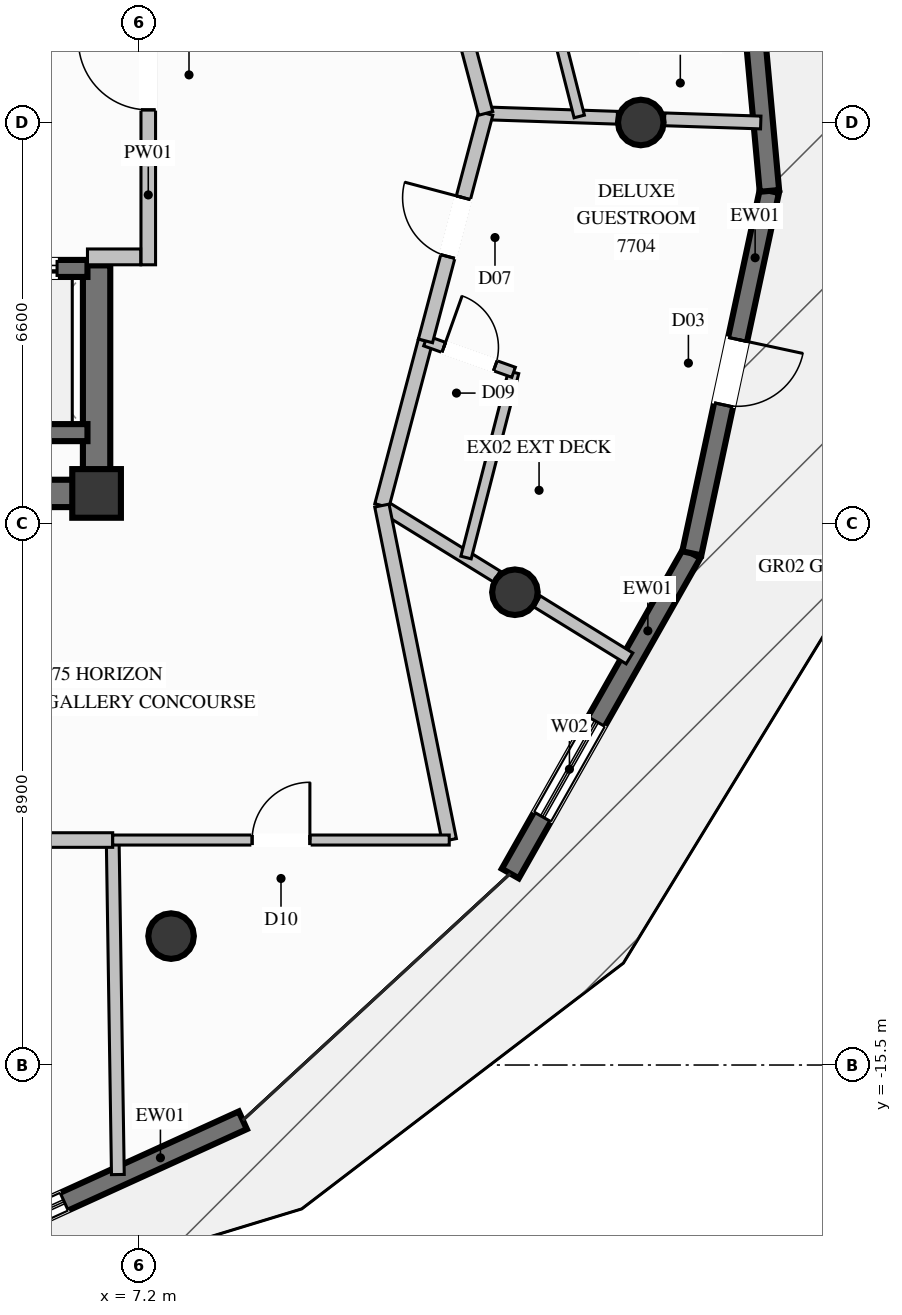
"""IFC4 building model, lengths in metres.
Left out: names, types, materials, properties, quantities, classifications, styles, units other than length and angle.
Written with IfcOpenShell. Run it as: python <this file> out.ifc"""

import sys

from ifc_helpers import new_model, si_unit, direction, frame, frame_2d, origin, origin_2d, place, context, subcontext, project, spatial, rectangle, circle, extrude, element, fill, save


model = new_model("IFC4")
c1 = context("Model", 3, precision=1e-05, world=origin(), true_north=direction((0.0, 1.0)))
c2 = subcontext(c1, "Body", "Model", "MODEL_VIEW")
j1 = project(units=[si_unit("LENGTHUNIT", "METRE"), si_unit("PLANEANGLEUNIT", "RADIAN")], contexts=[c1])
p1 = place(None, origin())
s1 = spatial("IfcSite", under=j1, at=p1, CompositionType="ELEMENT")
p2 = place(p1, origin())
s2 = spatial("IfcBuilding", under=s1, at=p2, CompositionType="ELEMENT")
p3 = place(p2, frame((0.0, 0.0, 289.6)))
s3 = spatial("IfcBuildingStorey", under=s2, at=p3, CompositionType="ELEMENT", Elevation=289.6)
p4 = place(p3, frame((6.5, -6.1, 0.0), z_axis=(0.0, 0.0, 1.0), x_axis=(1.0, 0.0, 0.0)))
e1 = element("IfcColumn", 1, at=p4, inside=s3, PredefinedType="COLUMN", context=c2, shape_type="SweptSolid", body=[
    extrude(rectangle(XDim=0.8, YDim=0.8, at=origin_2d()), origin(), (0.0, 0.0, 1.0), 3.8),
])
p5 = place(p3, frame((4.15, -6.1, 0.0), z_axis=(0.0, 0.0, 1.0), x_axis=(1.0, 0.0, 0.0)))
e2 = element("IfcWall", 2, at=p5, inside=s3, PredefinedType="SHEAR", context=c2, shape_type="SweptSolid", body=[
    extrude(rectangle(XDim=2.125, YDim=0.45, at=frame_2d((1.062, 0.0))), origin(), (0.0, 0.0, 1.0), 3.8),
])
p6 = place(p3, frame((6.5, -6.325, 0.0), z_axis=(0.0, 0.0, 1.0), x_axis=(0.0, 1.0, 0.0)))
e3 = element("IfcWall", 3, at=p6, inside=s3, PredefinedType="SHEAR", context=c2, shape_type="SweptSolid", body=[
    extrude(rectangle(XDim=3.975, YDim=0.45, at=frame_2d((1.987, 0.0))), origin(), (0.0, 0.0, 1.0), 3.8),
])
for number, where, z_axis, x_axis in (
    (4, (15.45, 0.0, 0.0), (0.0, 0.0, 1.0), (1.0, 0.0, 0.0)),
    (5, (7.725, -13.38, 0.0), (0.0, 0.0, 1.0), (1.0, 0.0, 0.0)),
    (6, (13.38, -7.725, 0.0), (0.0, 0.0, 1.0), (1.0, 0.0, 0.0)),
):
    element("IfcColumn", number, at=place(p3, frame(where, z_axis=z_axis, x_axis=x_axis)), inside=s3, PredefinedType="COLUMN", context=c2, shape_type="SweptSolid", body=[
        extrude(circle(Radius=0.375, at=origin_2d()), origin(), (0.0, 0.0, 1.0), 3.8),
    ])
p7 = place(p3, frame((8.905, -16.409, 0.0), z_axis=(0.0, 0.0, 1.0), x_axis=(-0.910118979779, -0.414347007526, 0.0)))
e7 = element("IfcWall", 7, at=p7, inside=s3, PredefinedType="SOLIDWALL", context=c2, shape_type="SweptSolid", body=[
    extrude(rectangle(XDim=5.916, YDim=0.32, at=frame_2d((2.958, 0.0))), origin(), (0.0, 0.0, 1.0), 3.57),
])
p8 = place(p7, frame((3.228, 0.0, 0.35)))
e8 = element("IfcOpeningElement", 8, at=p8, cuts=e7, PredefinedType="OPENING", context=c2, shape_type="SweptSolid", body=[
    extrude(rectangle(XDim=1.8, YDim=2.6, at=frame_2d((0.9, 1.3))), frame((0.0, 0.17, 0.0), z_axis=(0.0, -1.0, 0.0), x_axis=(1.0, 0.0, 0.0)), (0.0, 0.0, 1.0), 0.34),
])
p9 = place(p3, frame((16.289, -7.085, 0.0), z_axis=(0.0, 0.0, 1.0), x_axis=(-0.493134681356, -0.869952979214, 0.0)))
e9 = element("IfcWall", 9, at=p9, inside=s3, PredefinedType="SOLIDWALL", context=c2, shape_type="SweptSolid", body=[
    extrude(rectangle(XDim=6.053, YDim=0.32, at=frame_2d((3.027, 0.0))), origin(), (0.0, 0.0, 1.0), 3.57),
])
p10 = place(p9, frame((3.181, 0.0, 0.35)))
e10 = element("IfcOpeningElement", 10, at=p10, cuts=e9, PredefinedType="OPENING", context=c2, shape_type="SweptSolid", body=[
    extrude(rectangle(XDim=1.8, YDim=2.6, at=frame_2d((0.9, 1.3))), frame((0.0, 0.17, 0.0), z_axis=(0.0, -1.0, 0.0), x_axis=(1.0, 0.0, 0.0)), (0.0, 0.0, 1.0), 0.34),
])
p11 = place(p3, frame((17.566, -1.125, 0.0), z_axis=(0.0, 0.0, 1.0), x_axis=(-0.209485321593, -0.977811791725, 0.0)))
e11 = element("IfcWall", 11, at=p11, inside=s3, PredefinedType="SOLIDWALL", context=c2, shape_type="SweptSolid", body=[
    extrude(rectangle(XDim=6.095, YDim=0.32, at=frame_2d((3.048, 0.0))), origin(), (0.0, 0.0, 1.0), 3.57),
])
p12 = place(p11, frame((2.498, 0.0, 0.0)))
e12 = element("IfcOpeningElement", 12, at=p12, cuts=e11, PredefinedType="OPENING", context=c2, shape_type="SweptSolid", body=[
    extrude(rectangle(XDim=1.1, YDim=2.2, at=frame_2d((0.55, 1.1))), frame((0.0, 0.17, 0.0), z_axis=(0.0, -1.0, 0.0), x_axis=(1.0, 0.0, 0.0)), (0.0, 0.0, 1.0), 0.34),
])
p13 = place(p3, frame((17.012, 4.945, 0.0), z_axis=(0.0, 0.0, 1.0), x_axis=(0.090882437135, -0.99586162825, 0.0)))
e13 = element("IfcWall", 13, at=p13, inside=s3, PredefinedType="SOLIDWALL", context=c2, shape_type="SweptSolid", body=[
    extrude(rectangle(XDim=6.095, YDim=0.32, at=frame_2d((3.048, 0.0))), origin(), (0.0, 0.0, 1.0), 3.57),
])
p14 = place(p13, frame((1.531, 0.0, 0.35)))
e14 = element("IfcOpeningElement", 14, at=p14, cuts=e13, PredefinedType="OPENING", context=c2, shape_type="SweptSolid", body=[
    extrude(rectangle(XDim=1.8, YDim=2.6, at=frame_2d((0.9, 1.3))), frame((0.0, 0.17, 0.0), z_axis=(0.0, -1.0, 0.0), x_axis=(1.0, 0.0, 0.0)), (0.0, 0.0, 1.0), 0.34),
])
p15 = place(p3, frame((4.15, -5.1, 0.0), z_axis=(0.0, 0.0, 1.0), x_axis=(1.0, 0.0, 0.0)))
e15 = element("IfcWall", 15, at=p15, inside=s3, PredefinedType="SOLIDWALL", context=c2, shape_type="SweptSolid", body=[
    extrude(rectangle(XDim=2.2, YDim=0.28, at=frame_2d((1.1, 0.0))), origin(), (0.0, 0.0, 1.0), 3.57),
])
p16 = place(p3, frame((6.35, -2.4, 0.0), z_axis=(0.0, 0.0, 1.0), x_axis=(-1.0, 0.0, 0.0)))
e16 = element("IfcWall", 16, at=p16, inside=s3, PredefinedType="SOLIDWALL", context=c2, shape_type="SweptSolid", body=[
    extrude(rectangle(XDim=2.2, YDim=0.28, at=frame_2d((1.1, 0.0))), origin(), (0.0, 0.0, 1.0), 3.57),
])
p17 = place(p16, frame((0.5, 0.0, 0.0)))
e17 = element("IfcOpeningElement", 17, at=p17, cuts=e16, PredefinedType="OPENING", context=c2, shape_type="SweptSolid", body=[
    extrude(rectangle(XDim=1.2, YDim=2.2, at=frame_2d((0.6, 1.1))), frame((0.0, 0.15, 0.0), z_axis=(0.0, -1.0, 0.0), x_axis=(1.0, 0.0, 0.0)), (0.0, 0.0, 1.0), 0.3),
])
p18 = place(p3, frame((7.35, -2.34, 0.0), z_axis=(0.0, 0.0, 1.0), x_axis=(0.0, 1.0, 0.0)))
e18 = element("IfcWall", 18, at=p18, inside=s3, PredefinedType="PARTITIONING", context=c2, shape_type="SweptSolid", body=[
    extrude(rectangle(XDim=5.07, YDim=0.24, at=frame_2d((2.535, 0.0))), origin(), (0.0, 0.0, 1.0), 2.655),
])
p19 = place(p18, frame((2.548, 0.0, 0.0)))
e19 = element("IfcOpeningElement", 19, at=p19, cuts=e18, PredefinedType="OPENING", context=c2, shape_type="SweptSolid", body=[
    extrude(rectangle(XDim=1.15, YDim=2.2, at=frame_2d((0.575, 1.1))), frame((0.0, 0.13, 0.0), z_axis=(0.0, -1.0, 0.0), x_axis=(1.0, 0.0, 0.0)), (0.0, 0.0, 1.0), 0.26),
])
p20 = place(p3, frame((6.35, -2.21, 0.0), z_axis=(0.0, 0.0, 1.0), x_axis=(1.0, 0.0, 0.0)))
e20 = element("IfcWall", 20, at=p20, inside=s3, PredefinedType="PARTITIONING", context=c2, shape_type="SweptSolid", body=[
    extrude(rectangle(XDim=0.875, YDim=0.26, at=frame_2d((0.438, 0.0))), origin(), (0.0, 0.0, 1.0), 3.57),
])
p21 = place(p3, frame((12.9, 0.15, 0.0), z_axis=(0.0, 0.0, 1.0), x_axis=(0.999446158263, -0.033277270507, 0.0)))
e21 = element("IfcWall", 21, at=p21, inside=s3, PredefinedType="PARTITIONING", context=c2, shape_type="SweptSolid", body=[
    extrude(rectangle(XDim=2.164, YDim=0.21, at=frame_2d((1.082, 0.0))), origin(), (0.0, 0.0, 1.0), 3.57),
])
p22 = place(p3, frame((15.842, 0.052, 0.0), z_axis=(0.0, 0.0, 1.0), x_axis=(0.999459540267, -0.032872897171, 0.0)))
e22 = element("IfcWall", 22, at=p22, inside=s3, PredefinedType="PARTITIONING", context=c2, shape_type="SweptSolid", body=[
    extrude(rectangle(XDim=1.582, YDim=0.21, at=frame_2d((0.791, 0.0))), origin(), (0.0, 0.0, 1.0), 3.57),
])
p23 = place(p3, frame((11.192, -6.3, 0.0), z_axis=(0.0, 0.0, 1.0), x_axis=(0.851084090432, -0.525029400142, 0.0)))
e23 = element("IfcWall", 23, at=p23, inside=s3, PredefinedType="PARTITIONING", context=c2, shape_type="SweptSolid", body=[
    extrude(rectangle(XDim=2.221, YDim=0.21, at=frame_2d((1.11, 0.0))), origin(), (0.0, 0.0, 1.0), 3.085),
])
p24 = place(p3, frame((13.745, -7.876, 0.0), z_axis=(0.0, 0.0, 1.0), x_axis=(0.851065929173, -0.525058838799, 0.0)))
e24 = element("IfcWall", 24, at=p24, inside=s3, PredefinedType="PARTITIONING", context=c2, shape_type="SweptSolid", body=[
    extrude(rectangle(XDim=1.785, YDim=0.21, at=frame_2d((0.892, 0.0))), origin(), (0.0, 0.0, 1.0), 3.57),
])
p25 = place(p3, frame((11.192, -6.3, 0.0), z_axis=(0.0, 0.0, 1.0), x_axis=(0.255878192504, 0.966709030992, 0.0)))
e25 = element("IfcWall", 25, at=p25, inside=s3, PredefinedType="PARTITIONING", context=c2, shape_type="SweptSolid", body=[
    extrude(rectangle(XDim=2.802, YDim=0.24, at=frame_2d((1.401, 0.0))), origin(), (0.0, 0.0, 1.0), 3.57),
])
p26 = place(p3, frame((12.576, -7.154, 0.0), z_axis=(0.0, 0.0, 1.0), x_axis=(0.248649895868, 0.968593428268, 0.0)))
e26 = element("IfcWall", 26, at=p26, inside=s3, PredefinedType="PLUMBINGWALL", context=c2, shape_type="SweptSolid", body=[
    extrude(rectangle(XDim=3.145, YDim=0.175, at=frame_2d((1.573, 0.0))), origin(), (0.0, 0.0, 1.0), 3.57),
])
p27 = place(p3, frame((11.909, -3.591, 0.0), z_axis=(0.0, 0.0, 1.0), x_axis=(0.941874685166, -0.335964399073, 0.0)))
e27 = element("IfcWall", 27, at=p27, inside=s3, PredefinedType="PLUMBINGWALL", context=c2, shape_type="SweptSolid", body=[
    extrude(rectangle(XDim=1.538, YDim=0.175, at=frame_2d((0.769, 0.0))), origin(), (0.0, 0.0, 1.0), 3.57),
])
p28 = place(p27, frame((0.319, 0.0, 0.0)))
e28 = element("IfcOpeningElement", 28, at=p28, cuts=e27, PredefinedType="OPENING", context=c2, shape_type="SweptSolid", body=[
    extrude(rectangle(XDim=0.9, YDim=2.1, at=frame_2d((0.45, 1.05))), frame((0.0, 0.098, 0.0), z_axis=(0.0, -1.0, 0.0), x_axis=(1.0, 0.0, 0.0)), (0.0, 0.0, 1.0), 0.195),
])
p29 = place(p3, frame((11.909, -3.591, 0.0), z_axis=(0.0, 0.0, 1.0), x_axis=(0.256064218317, 0.96665977267, 0.0)))
e29 = element("IfcWall", 29, at=p29, inside=s3, PredefinedType="PARTITIONING", context=c2, shape_type="SweptSolid", body=[
    extrude(rectangle(XDim=3.87, YDim=0.24, at=frame_2d((1.935, 0.0))), origin(), (0.0, 0.0, 1.0), 3.57),
])
p30 = place(p29, frame((1.435, 0.0, 0.0)))
e30 = element("IfcOpeningElement", 30, at=p30, cuts=e29, PredefinedType="OPENING", context=c2, shape_type="SweptSolid", body=[
    extrude(rectangle(XDim=1.0, YDim=2.2, at=frame_2d((0.5, 1.1))), frame((0.0, 0.13, 0.0), z_axis=(0.0, -1.0, 0.0), x_axis=(1.0, 0.0, 0.0)), (0.0, 0.0, 1.0), 0.26),
])
p31 = place(p3, frame((12.9, 0.15, 0.0), z_axis=(0.0, 0.0, 1.0), x_axis=(-0.255796771697, 0.966730578594, 0.0)))
e31 = element("IfcWall", 31, at=p31, inside=s3, PredefinedType="PARTITIONING", context=c2, shape_type="SweptSolid", body=[
    extrude(rectangle(XDim=2.802, YDim=0.24, at=frame_2d((1.401, 0.0))), origin(), (0.0, 0.0, 1.0), 3.57),
])
p32 = place(p3, frame((14.438, 0.099, 0.0), z_axis=(0.0, 0.0, 1.0), x_axis=(-0.245235496537, 0.969463537859, 0.0)))
e32 = element("IfcWall", 32, at=p32, inside=s3, PredefinedType="PLUMBINGWALL", context=c2, shape_type="SweptSolid", body=[
    extrude(rectangle(XDim=3.148, YDim=0.175, at=frame_2d((1.574, 0.0))), origin(), (0.0, 0.0, 1.0), 3.57),
])
p33 = place(p3, frame((6.765, -11.8, 0.0), z_axis=(0.0, 0.0, 1.0), x_axis=(0.015487224523, -0.999880065746, 0.0)))
e33 = element("IfcWall", 33, at=p33, inside=s3, PredefinedType="PARTITIONING", context=c2, shape_type="SweptSolid", body=[
    extrude(rectangle(XDim=5.502, YDim=0.21, at=frame_2d((2.751, 0.0))), origin(), (0.0, 0.0, 1.0), 3.57),
])
p34 = place(p3, frame((0.0, -11.8, 0.0), z_axis=(0.0, 0.0, 1.0), x_axis=(1.0, 0.0, 0.0)))
e34 = element("IfcWall", 34, at=p34, inside=s3, PredefinedType="PARTITIONING", context=c2, shape_type="SweptSolid", body=[
    extrude(rectangle(XDim=6.765, YDim=0.24, at=frame_2d((3.382, 0.0))), origin(), (0.0, 0.0, 1.0), 3.57),
])
p35 = place(p34, frame((2.882, 0.0, 0.0)))
e35 = element("IfcOpeningElement", 35, at=p35, cuts=e34, PredefinedType="OPENING", context=c2, shape_type="SweptSolid", body=[
    extrude(rectangle(XDim=1.0, YDim=2.2, at=frame_2d((0.5, 1.1))), frame((0.0, 0.13, 0.0), z_axis=(0.0, -1.0, 0.0), x_axis=(1.0, 0.0, 0.0)), (0.0, 0.0, 1.0), 0.26),
])
p36 = place(p3, frame((12.3, -11.8, 0.0), z_axis=(0.0, 0.0, 1.0), x_axis=(-0.197513428752, 0.980300181303, 0.0)))
e36 = element("IfcWall", 36, at=p36, inside=s3, PredefinedType="PARTITIONING", context=c2, shape_type="SweptSolid", body=[
    extrude(rectangle(XDim=5.611, YDim=0.24, at=frame_2d((2.805, 0.0))), origin(), (0.0, 0.0, 1.0), 3.57),
])
p37 = place(p3, frame((6.765, -11.8, 0.0), z_axis=(0.0, 0.0, 1.0), x_axis=(1.0, 0.0, 0.0)))
e37 = element("IfcWall", 37, at=p37, inside=s3, PredefinedType="PARTITIONING", context=c2, shape_type="SweptSolid", body=[
    extrude(rectangle(XDim=5.535, YDim=0.165, at=frame_2d((2.768, 0.0))), origin(), (0.0, 0.0, 1.0), 3.57),
])
p38 = place(p37, frame((2.293, 0.0, 0.0)))
e38 = element("IfcOpeningElement", 38, at=p38, cuts=e37, PredefinedType="OPENING", context=c2, shape_type="SweptSolid", body=[
    extrude(rectangle(XDim=0.95, YDim=2.1, at=frame_2d((0.475, 1.05))), frame((0.0, 0.093, 0.0), z_axis=(0.0, -1.0, 0.0), x_axis=(1.0, 0.0, 0.0)), (0.0, 0.0, 1.0), 0.185),
])
p39 = place(p8, origin())
e39 = element("IfcWindow", 39, at=p39, inside=s3, PartitioningType="SINGLE_PANEL", PredefinedType="WINDOW", context=c2, shape_type="SweptSolid", body=[
    extrude(rectangle(XDim=1.8, YDim=2.6, at=frame_2d((0.9, 1.3))), frame((0.0, 0.03, 0.0), z_axis=(0.0, -1.0, 0.0), x_axis=(1.0, 0.0, 0.0)), (0.0, 0.0, 1.0), 0.06),
])
fill(e8, e39)
p40 = place(p10, origin())
e40 = element("IfcWindow", 40, at=p40, inside=s3, PartitioningType="SINGLE_PANEL", PredefinedType="WINDOW", context=c2, shape_type="SweptSolid", body=[
    extrude(rectangle(XDim=1.8, YDim=2.6, at=frame_2d((0.9, 1.3))), frame((0.0, 0.03, 0.0), z_axis=(0.0, -1.0, 0.0), x_axis=(1.0, 0.0, 0.0)), (0.0, 0.0, 1.0), 0.06),
])
fill(e10, e40)
p41 = place(p12, origin())
e41 = element("IfcDoor", 41, at=p41, inside=s3, OperationType="SINGLE_SWING_LEFT", PredefinedType="DOOR", context=c2, shape_type="SweptSolid", body=[
    extrude(rectangle(XDim=1.1, YDim=2.2, at=frame_2d((0.55, 1.1))), frame((0.0, 0.025, 0.0), z_axis=(0.0, -1.0, 0.0), x_axis=(1.0, 0.0, 0.0)), (0.0, 0.0, 1.0), 0.05),
])
fill(e12, e41)
p42 = place(p17, origin())
e42 = element("IfcDoor", 42, at=p42, inside=s3, OperationType="SLIDING_TO_LEFT", PredefinedType="DOOR", context=c2, shape_type="SweptSolid", body=[
    extrude(rectangle(XDim=1.2, YDim=2.2, at=frame_2d((0.6, 1.1))), frame((0.0, 0.025, 0.0), z_axis=(0.0, -1.0, 0.0), x_axis=(1.0, 0.0, 0.0)), (0.0, 0.0, 1.0), 0.05),
])
fill(e17, e42)
p43 = place(p19, origin())
e43 = element("IfcDoor", 43, at=p43, inside=s3, OperationType="SINGLE_SWING_RIGHT", PredefinedType="DOOR", context=c2, shape_type="SweptSolid", body=[
    extrude(rectangle(XDim=1.15, YDim=2.2, at=frame_2d((0.575, 1.1))), frame((0.0, 0.025, 0.0), z_axis=(0.0, -1.0, 0.0), x_axis=(1.0, 0.0, 0.0)), (0.0, 0.0, 1.0), 0.05),
])
fill(e19, e43)
p44 = place(p28, origin())
e44 = element("IfcDoor", 44, at=p44, inside=s3, OperationType="SINGLE_SWING_LEFT", PredefinedType="DOOR", context=c2, shape_type="SweptSolid", body=[
    extrude(rectangle(XDim=0.9, YDim=2.1, at=frame_2d((0.45, 1.05))), frame((0.0, 0.025, 0.0), z_axis=(0.0, -1.0, 0.0), x_axis=(1.0, 0.0, 0.0)), (0.0, 0.0, 1.0), 0.05),
])
fill(e28, e44)
p45 = place(p30, origin())
e45 = element("IfcDoor", 45, at=p45, inside=s3, OperationType="SINGLE_SWING_RIGHT", PredefinedType="DOOR", context=c2, shape_type="SweptSolid", body=[
    extrude(rectangle(XDim=1.0, YDim=2.2, at=frame_2d((0.5, 1.1))), frame((0.0, 0.025, 0.0), z_axis=(0.0, -1.0, 0.0), x_axis=(1.0, 0.0, 0.0)), (0.0, 0.0, 1.0), 0.05),
])
fill(e30, e45)
p46 = place(p38, origin())
e46 = element("IfcDoor", 46, at=p46, inside=s3, OperationType="SINGLE_SWING_RIGHT", PredefinedType="DOOR", context=c2, shape_type="SweptSolid", body=[
    extrude(rectangle(XDim=0.95, YDim=2.1, at=frame_2d((0.475, 1.05))), frame((0.0, 0.025, 0.0), z_axis=(0.0, -1.0, 0.0), x_axis=(1.0, 0.0, 0.0)), (0.0, 0.0, 1.0), 0.05),
])
fill(e38, e46)
save(model, sys.argv[1])
